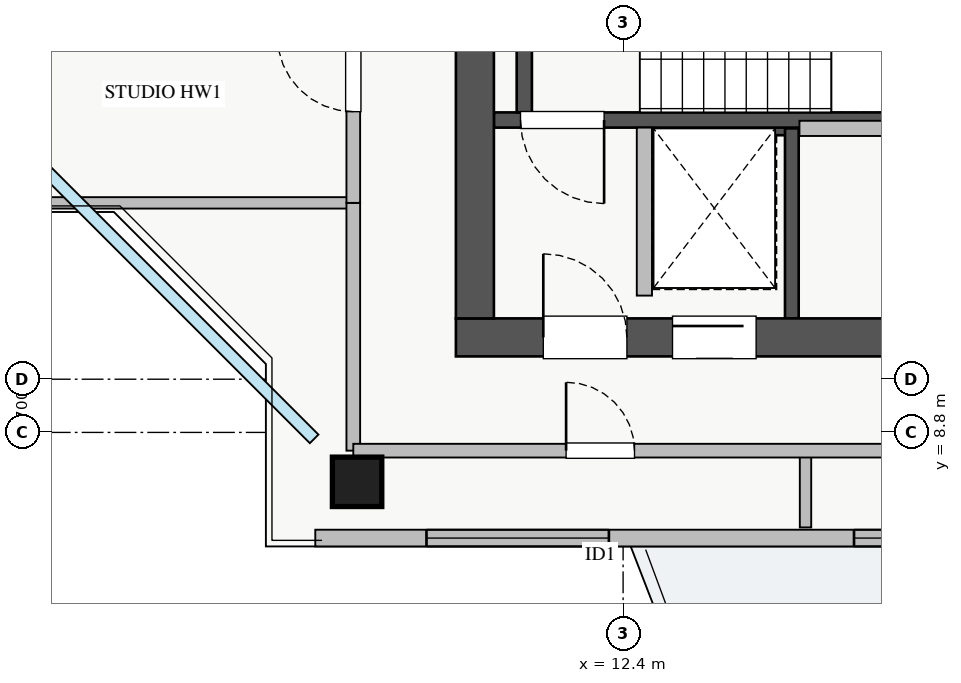
"""IFC4 building model, lengths in metres.
Left out: names, types, materials, properties, quantities, classifications, styles, units other than length and angle.
Written with IfcOpenShell. Run it as: python <this file> out.ifc"""

import sys

from ifc_helpers import new_model, si_unit, direction, frame, frame_2d, origin, origin_2d, place, context, subcontext, project, spatial, rectangle, extrude, source, transform, mapped, element, fill, save


model = new_model("IFC4")
c1 = context("Model", 3, precision=1e-05, world=origin(), true_north=direction((0.0, 1.0)))
c2 = subcontext(c1, "Body", "Model", "MODEL_VIEW")
j1 = project(units=[si_unit("LENGTHUNIT", "METRE"), si_unit("PLANEANGLEUNIT", "RADIAN")], contexts=[c1])
p1 = place(None, origin())
s1 = spatial("IfcSite", under=j1, at=p1, CompositionType="ELEMENT")
p2 = place(p1, origin())
s2 = spatial("IfcBuilding", under=s1, at=p2, CompositionType="ELEMENT")
p3 = place(p2, frame((0.0, 0.0, 260.0)))
s3 = spatial("IfcBuildingStorey", under=s2, at=p3, CompositionType="ELEMENT", Elevation=260.0)
p4 = place(p3, frame((12.68, 12.8, 0.0), z_axis=(0.0, 0.0, 1.0), x_axis=(1.0, 0.0, 0.0)))
e1 = element("IfcWall", 1, at=p4, inside=s3, PredefinedType="SHEAR", context=c2, shape_type="SweptSolid", body=[
    extrude(rectangle(XDim=1.94, YDim=0.18, at=frame_2d((0.97, 0.0))), origin(), (0.0, 0.0, 1.0), 3.03),
])
p5 = place(p3, frame((14.62, 10.3, 0.0), z_axis=(0.0, 0.0, 1.0), x_axis=(0.0, 1.0, 0.0)))
e2 = element("IfcWall", 2, at=p5, inside=s3, PredefinedType="SHEAR", context=c2, shape_type="SweptSolid", body=[
    extrude(rectangle(XDim=2.5, YDim=0.18, at=frame_2d((1.25, 0.0))), origin(), (0.0, 0.0, 1.0), 3.03),
])
p6 = place(p3, frame((10.7, 12.91, 0.0), z_axis=(0.0, 0.0, 1.0), x_axis=(1.0, 0.0, 0.0)))
e3 = element("IfcWall", 3, at=p6, inside=s3, PredefinedType="SHEAR", context=c2, shape_type="SweptSolid", body=[
    extrude(rectangle(XDim=7.45, YDim=0.2, at=frame_2d((3.725, 0.0))), origin(), (0.0, 0.0, 1.0), 3.25),
])
p7 = place(p6, frame((0.35, 0.0, 0.0)))
e4 = element("IfcOpeningElement", 4, at=p7, cuts=e3, PredefinedType="OPENING", context=c2, shape_type="SweptSolid", body=[
    extrude(rectangle(XDim=1.1, YDim=2.05, at=frame_2d((0.55, 1.025))), frame((0.0, 0.11, 0.0), z_axis=(0.0, -1.0, 0.0), x_axis=(1.0, 0.0, 0.0)), (0.0, 0.0, 1.0), 0.22),
])
p8 = place(p3, frame((11.1, 13.01, 0.0), z_axis=(0.0, 0.0, 1.0), x_axis=(0.0, 1.0, 0.0)))
e5 = element("IfcWall", 5, at=p8, inside=s3, PredefinedType="SHEAR", context=c2, shape_type="SweptSolid", body=[
    extrude(rectangle(XDim=2.94, YDim=0.2, at=frame_2d((1.47, 0.0))), origin(), (0.0, 0.0, 1.0), 3.25),
])
p9 = place(p3, frame((10.2, 10.05, 0.0), z_axis=(0.0, 0.0, 1.0), x_axis=(1.0, 0.0, 0.0)))
e6 = element("IfcWall", 6, at=p9, inside=s3, PredefinedType="SHEAR", context=c2, shape_type="SweptSolid", body=[
    extrude(rectangle(XDim=17.6, YDim=0.5, at=frame_2d((8.8, 0.0))), origin(), (0.0, 0.0, 1.0), 3.25),
])
p10 = place(p9, frame((1.15, 0.0, 0.0)))
e7 = element("IfcOpeningElement", 7, at=p10, cuts=e6, PredefinedType="OPENING", context=c2, shape_type="SweptSolid", body=[
    extrude(rectangle(XDim=1.1, YDim=2.05, at=frame_2d((0.55, 1.025))), frame((0.0, 0.26, 0.0), z_axis=(0.0, -1.0, 0.0), x_axis=(1.0, 0.0, 0.0)), (0.0, 0.0, 1.0), 0.52),
])
p11 = place(p9, frame((8.3, 0.0, 0.0)))
e8 = element("IfcOpeningElement", 8, at=p11, cuts=e6, PredefinedType="OPENING", context=c2, shape_type="SweptSolid", body=[
    extrude(rectangle(XDim=1.1, YDim=2.05, at=frame_2d((0.55, 1.025))), frame((0.0, 0.26, 0.0), z_axis=(0.0, -1.0, 0.0), x_axis=(1.0, 0.0, 0.0)), (0.0, 0.0, 1.0), 0.52),
])
p12 = place(p9, frame((2.85, 0.0, 0.0)))
e9 = element("IfcOpeningElement", 9, at=p12, cuts=e6, PredefinedType="OPENING", context=c2, shape_type="SweptSolid", body=[
    extrude(rectangle(XDim=1.1, YDim=2.05, at=frame_2d((0.55, 1.025))), frame((0.0, 0.26, 0.0), z_axis=(0.0, -1.0, 0.0), x_axis=(1.0, 0.0, 0.0)), (0.0, 0.0, 1.0), 0.52),
])
p13 = place(p9, frame((5.8, 0.0, 0.0)))
e10 = element("IfcOpeningElement", 10, at=p13, cuts=e6, PredefinedType="OPENING", context=c2, shape_type="SweptSolid", body=[
    extrude(rectangle(XDim=1.0, YDim=2.05, at=frame_2d((0.5, 1.025))), frame((0.0, 0.26, 0.0), z_axis=(0.0, -1.0, 0.0), x_axis=(1.0, 0.0, 0.0)), (0.0, 0.0, 1.0), 0.52),
])
p14 = place(p9, frame((14.74, 0.0, 0.0)))
e11 = element("IfcOpeningElement", 11, at=p14, cuts=e6, PredefinedType="OPENING", context=c2, shape_type="SweptSolid", body=[
    extrude(rectangle(XDim=1.0, YDim=2.05, at=frame_2d((0.5, 1.025))), frame((0.0, 0.26, 0.0), z_axis=(0.0, -1.0, 0.0), x_axis=(1.0, 0.0, 0.0)), (0.0, 0.0, 1.0), 0.52),
])
p15 = place(p9, frame((10.64, 0.0, 0.0)))
e12 = element("IfcOpeningElement", 12, at=p15, cuts=e6, PredefinedType="OPENING", context=c2, shape_type="SweptSolid", body=[
    extrude(rectangle(XDim=1.0, YDim=2.05, at=frame_2d((0.5, 1.025))), frame((0.0, 0.26, 0.0), z_axis=(0.0, -1.0, 0.0), x_axis=(1.0, 0.0, 0.0)), (0.0, 0.0, 1.0), 0.52),
])
p16 = place(p9, frame((13.09, 0.0, 0.0)))
e13 = element("IfcOpeningElement", 13, at=p16, cuts=e6, PredefinedType="OPENING", context=c2, shape_type="SweptSolid", body=[
    extrude(rectangle(XDim=1.0, YDim=2.05, at=frame_2d((0.5, 1.025))), frame((0.0, 0.26, 0.0), z_axis=(0.0, -1.0, 0.0), x_axis=(1.0, 0.0, 0.0)), (0.0, 0.0, 1.0), 0.52),
])
p17 = place(p3, frame((10.45, 10.3, 0.0), z_axis=(0.0, 0.0, 1.0), x_axis=(0.0, 1.0, 0.0)))
e14 = element("IfcWall", 14, at=p17, inside=s3, PredefinedType="SHEAR", context=c2, shape_type="SweptSolid", body=[
    extrude(rectangle(XDim=6.2, YDim=0.5, at=frame_2d((3.1, 0.0))), origin(), (0.0, 0.0, 1.0), 3.25),
])
m1 = source(origin(), c2, "Body", "SweptSolid", [
    extrude(rectangle(XDim=0.65, YDim=0.65, at=origin_2d()), origin(), (0.0, 0.0, 1.0), 3.25),
])
p18 = place(p3, frame((8.9, 8.15, 0.0), z_axis=(0.0, 0.0, 1.0), x_axis=(1.0, 0.0, 0.0)))
e15 = element("IfcColumn", 15, at=p18, inside=s3, PredefinedType="COLUMN", context=c2, shape_type="MappedRepresentation", body=[
    mapped(m1, transform((0.0, 0.0, 0.0), x_axis=(1.0, 0.0, 0.0), y_axis=(0.0, 1.0, 0.0), z_axis=(0.0, 0.0, 1.0), scale=1.0)),
])
p19 = place(p3, frame((8.35, 7.41, 0.0), z_axis=(0.0, 0.0, 1.0), x_axis=(1.0, 0.0, 0.0)))
e16 = element("IfcWall", 16, at=p19, inside=s3, PredefinedType="STANDARD", context=c2, shape_type="SweptSolid", body=[
    extrude(rectangle(XDim=21.3, YDim=0.22, at=frame_2d((10.65, 0.0))), origin(), (0.0, 0.0, 1.0), 2.57),
])
p20 = place(p19, frame((11.5, 0.0, 0.0)))
e17 = element("IfcOpeningElement", 17, at=p20, cuts=e16, PredefinedType="OPENING", context=c2, shape_type="SweptSolid", body=[
    extrude(rectangle(XDim=1.2, YDim=2.1, at=frame_2d((0.6, 1.05))), frame((0.0, 0.12, 0.0), z_axis=(0.0, -1.0, 0.0), x_axis=(1.0, 0.0, 0.0)), (0.0, 0.0, 1.0), 0.24),
])
p21 = place(p19, frame((1.463, 0.0, 0.9)))
e18 = element("IfcOpeningElement", 18, at=p21, cuts=e16, PredefinedType="OPENING", context=c2, shape_type="SweptSolid", body=[
    extrude(rectangle(XDim=2.4, YDim=1.48, at=frame_2d((1.2, 0.74))), frame((0.0, 0.12, 0.0), z_axis=(0.0, -1.0, 0.0), x_axis=(1.0, 0.0, 0.0)), (0.0, 0.0, 1.0), 0.24),
])
p22 = place(p19, frame((7.088, 0.0, 0.9)))
e19 = element("IfcOpeningElement", 19, at=p22, cuts=e16, PredefinedType="OPENING", context=c2, shape_type="SweptSolid", body=[
    extrude(rectangle(XDim=1.8, YDim=1.45, at=frame_2d((0.9, 0.725))), frame((0.0, 0.12, 0.0), z_axis=(0.0, -1.0, 0.0), x_axis=(1.0, 0.0, 0.0)), (0.0, 0.0, 1.0), 0.24),
])
p23 = place(p19, frame((19.775, 0.0, 0.9)))
e20 = element("IfcOpeningElement", 20, at=p23, cuts=e16, PredefinedType="OPENING", context=c2, shape_type="SweptSolid", body=[
    extrude(rectangle(XDim=1.2, YDim=1.4, at=frame_2d((0.6, 0.7))), frame((0.0, 0.12, 0.0), z_axis=(0.0, -1.0, 0.0), x_axis=(1.0, 0.0, 0.0)), (0.0, 0.0, 1.0), 0.24),
])
p24 = place(p19, frame((15.042, 0.0, 0.9)))
e21 = element("IfcOpeningElement", 21, at=p24, cuts=e16, PredefinedType="OPENING", context=c2, shape_type="SweptSolid", body=[
    extrude(rectangle(XDim=2.4, YDim=1.5, at=frame_2d((1.2, 0.75))), frame((0.0, 0.12, 0.0), z_axis=(0.0, -1.0, 0.0), x_axis=(1.0, 0.0, 0.0)), (0.0, 0.0, 1.0), 0.24),
])
p25 = place(p3, frame((12.68, 10.6, 0.0), z_axis=(0.0, 0.0, 1.0), x_axis=(0.0, 1.0, 0.0)))
e22 = element("IfcWall", 22, at=p25, inside=s3, PredefinedType="PARTITIONING", context=c2, shape_type="SweptSolid", body=[
    extrude(rectangle(XDim=2.21, YDim=0.2, at=frame_2d((1.105, 0.0))), origin(), (0.0, 0.0, 1.0), 3.03),
])
p26 = place(p3, frame((14.72, 12.8, 0.0), z_axis=(0.0, 0.0, 1.0), x_axis=(1.0, 0.0, 0.0)))
e23 = element("IfcWall", 23, at=p26, inside=s3, PredefinedType="PARTITIONING", context=c2, shape_type="SweptSolid", body=[
    extrude(rectangle(XDim=3.28, YDim=0.2, at=frame_2d((1.64, 0.0))), origin(), (0.0, 0.0, 1.0), 3.03),
])
p27 = place(p3, frame((3.55, 11.82, 0.0), z_axis=(0.0, 0.0, 1.0), x_axis=(1.0, 0.0, 0.0)))
e24 = element("IfcWall", 24, at=p27, inside=s3, PredefinedType="PARTITIONING", context=c2, shape_type="SweptSolid", body=[
    extrude(rectangle(XDim=5.3, YDim=0.15, at=frame_2d((2.65, 0.0))), origin(), (0.0, 0.0, 1.0), 3.03),
])
p28 = place(p3, frame((8.85, 8.56, 0.0), z_axis=(0.0, 0.0, 1.0), x_axis=(0.0, 1.0, 0.0)))
e25 = element("IfcWall", 25, at=p28, inside=s3, PredefinedType="PARTITIONING", context=c2, shape_type="SweptSolid", body=[
    extrude(rectangle(XDim=3.26, YDim=0.18, at=frame_2d((1.63, 0.0))), origin(), (0.0, 0.0, 1.0), 2.529),
])
p29 = place(p3, frame((14.8, 7.55, 0.0), z_axis=(0.0, 0.0, 1.0), x_axis=(0.0, 1.0, 0.0)))
e26 = element("IfcWall", 26, at=p29, inside=s3, PredefinedType="PARTITIONING", context=c2, shape_type="SweptSolid", body=[
    extrude(rectangle(XDim=1.01, YDim=0.15, at=frame_2d((0.505, 0.0))), origin(), (0.0, 0.0, 1.0), 3.03),
])
p30 = place(p3, frame((8.85, 8.56, 0.0), z_axis=(0.0, 0.0, 1.0), x_axis=(1.0, 0.0, 0.0)))
e27 = element("IfcWall", 27, at=p30, inside=s3, PredefinedType="PARTITIONING", context=c2, shape_type="SweptSolid", body=[
    extrude(rectangle(XDim=18.95, YDim=0.18, at=frame_2d((9.475, 0.0))), origin(), (0.0, 0.0, 1.0), 3.03),
])
p31 = place(p30, frame((2.8, 0.0, 0.0)))
e28 = element("IfcOpeningElement", 28, at=p31, cuts=e27, PredefinedType="OPENING", context=c2, shape_type="SweptSolid", body=[
    extrude(rectangle(XDim=0.9, YDim=2.05, at=frame_2d((0.45, 1.025))), frame((0.0, 0.1, 0.0), z_axis=(0.0, -1.0, 0.0), x_axis=(1.0, 0.0, 0.0)), (0.0, 0.0, 1.0), 0.2),
])
p32 = place(p30, frame((8.8, 0.0, 0.0)))
e29 = element("IfcOpeningElement", 29, at=p32, cuts=e27, PredefinedType="OPENING", context=c2, shape_type="SweptSolid", body=[
    extrude(rectangle(XDim=0.9, YDim=2.05, at=frame_2d((0.45, 1.025))), frame((0.0, 0.1, 0.0), z_axis=(0.0, -1.0, 0.0), x_axis=(1.0, 0.0, 0.0)), (0.0, 0.0, 1.0), 0.2),
])
p33 = place(p30, frame((15.2, 0.0, 0.0)))
e30 = element("IfcOpeningElement", 30, at=p33, cuts=e27, PredefinedType="OPENING", context=c2, shape_type="SweptSolid", body=[
    extrude(rectangle(XDim=0.9, YDim=2.05, at=frame_2d((0.45, 1.025))), frame((0.0, 0.1, 0.0), z_axis=(0.0, -1.0, 0.0), x_axis=(1.0, 0.0, 0.0)), (0.0, 0.0, 1.0), 0.2),
])
p34 = place(p3, frame((8.85, 11.82, 0.0), z_axis=(0.0, 0.0, 1.0), x_axis=(0.0, 1.0, 0.0)))
e31 = element("IfcWall", 31, at=p34, inside=s3, PredefinedType="PARTITIONING", context=c2, shape_type="SweptSolid", body=[
    extrude(rectangle(XDim=22.36, YDim=0.18, at=frame_2d((11.18, 0.0))), origin(), (0.0, 0.0, 1.0), 2.529),
])
p35 = place(p34, frame((1.2, 0.0, 0.0)))
e32 = element("IfcOpeningElement", 32, at=p35, cuts=e31, PredefinedType="OPENING", context=c2, shape_type="SweptSolid", body=[
    extrude(rectangle(XDim=1.0, YDim=2.05, at=frame_2d((0.5, 1.025))), frame((0.0, 0.1, 0.0), z_axis=(0.0, -1.0, 0.0), x_axis=(1.0, 0.0, 0.0)), (0.0, 0.0, 1.0), 0.2),
])
p36 = place(p34, frame((8.445, 0.0, 0.0)))
e33 = element("IfcOpeningElement", 33, at=p36, cuts=e31, PredefinedType="OPENING", context=c2, shape_type="SweptSolid", body=[
    extrude(rectangle(XDim=1.0, YDim=2.05, at=frame_2d((0.5, 1.025))), frame((0.0, 0.1, 0.0), z_axis=(0.0, -1.0, 0.0), x_axis=(1.0, 0.0, 0.0)), (0.0, 0.0, 1.0), 0.2),
])
p37 = place(p34, frame((16.23, 0.0, 0.0)))
e34 = element("IfcOpeningElement", 34, at=p37, cuts=e31, PredefinedType="OPENING", context=c2, shape_type="SweptSolid", body=[
    extrude(rectangle(XDim=1.0, YDim=2.05, at=frame_2d((0.5, 1.025))), frame((0.0, 0.1, 0.0), z_axis=(0.0, -1.0, 0.0), x_axis=(1.0, 0.0, 0.0)), (0.0, 0.0, 1.0), 0.2),
])
m2 = source(origin(), c2, "Body", "SweptSolid", [
    extrude(rectangle(XDim=2.4, YDim=1.48, at=frame_2d((1.2, 0.74))), frame((0.0, 0.03, 0.0), z_axis=(0.0, -1.0, 0.0), x_axis=(1.0, 0.0, 0.0)), (0.0, 0.0, 1.0), 0.06),
])
p38 = place(p21, origin())
e35 = element("IfcWindow", 35, at=p38, inside=s3, PartitioningType="TRIPLE_PANEL_VERTICAL", PredefinedType="WINDOW", context=c2, shape_type="MappedRepresentation", body=[
    mapped(m2, transform((0.0, 0.0, 0.0), x_axis=(1.0, 0.0, 0.0), y_axis=(0.0, 1.0, 0.0), z_axis=(0.0, 0.0, 1.0), scale=1.0)),
])
fill(e18, e35)
m3 = source(origin(), c2, "Body", "SweptSolid", [
    extrude(rectangle(XDim=1.8, YDim=1.45, at=frame_2d((0.9, 0.725))), frame((0.0, 0.03, 0.0), z_axis=(0.0, -1.0, 0.0), x_axis=(1.0, 0.0, 0.0)), (0.0, 0.0, 1.0), 0.06),
])
p39 = place(p22, origin())
e36 = element("IfcWindow", 36, at=p39, inside=s3, PartitioningType="DOUBLE_PANEL_VERTICAL", PredefinedType="WINDOW", context=c2, shape_type="MappedRepresentation", body=[
    mapped(m3, transform((0.0, 0.0, 0.0), x_axis=(1.0, 0.0, 0.0), y_axis=(0.0, 1.0, 0.0), z_axis=(0.0, 0.0, 1.0), scale=1.0)),
])
fill(e19, e36)
m4 = source(origin(), c2, "Body", "SweptSolid", [
    extrude(rectangle(XDim=1.1, YDim=2.05, at=frame_2d((0.55, 1.025))), frame((0.0, 0.025, 0.0), z_axis=(0.0, -1.0, 0.0), x_axis=(1.0, 0.0, 0.0)), (0.0, 0.0, 1.0), 0.05),
])
p40 = place(p10, origin())
e37 = element("IfcDoor", 37, at=p40, inside=s3, OperationType="SINGLE_SWING_LEFT", PredefinedType="DOOR", context=c2, shape_type="MappedRepresentation", body=[
    mapped(m4, transform((0.0, 0.0, 0.0), x_axis=(1.0, 0.0, 0.0), y_axis=(0.0, 1.0, 0.0), z_axis=(0.0, 0.0, 1.0), scale=1.0)),
])
fill(e7, e37)
p41 = place(p7, frame((1.1, 0.0, 0.0), z_axis=(0.0, 0.0, 1.0), x_axis=(-1.0, 0.0, 0.0)))
e38 = element("IfcDoor", 38, at=p41, inside=s3, OperationType="SINGLE_SWING_RIGHT", PredefinedType="DOOR", context=c2, shape_type="MappedRepresentation", body=[
    mapped(m4, transform((0.0, 0.0, 0.0), x_axis=(1.0, 0.0, 0.0), y_axis=(0.0, 1.0, 0.0), z_axis=(0.0, 0.0, 1.0), scale=1.0)),
])
fill(e4, e38)
p42 = place(p12, origin())
e39 = element("IfcDoor", 39, at=p42, inside=s3, OperationType="SLIDING_TO_RIGHT", PredefinedType="DOOR", context=c2, shape_type="MappedRepresentation", body=[
    mapped(m4, transform((0.0, 0.0, 0.0), x_axis=(1.0, 0.0, 0.0), y_axis=(0.0, 1.0, 0.0), z_axis=(0.0, 0.0, 1.0), scale=1.0)),
])
fill(e9, e39)
m5 = source(origin(), c2, "Body", "SweptSolid", [
    extrude(rectangle(XDim=0.9, YDim=2.05, at=frame_2d((0.45, 1.025))), frame((0.0, 0.025, 0.0), z_axis=(0.0, -1.0, 0.0), x_axis=(1.0, 0.0, 0.0)), (0.0, 0.0, 1.0), 0.05),
])
p43 = place(p31, origin())
e40 = element("IfcDoor", 40, at=p43, inside=s3, OperationType="SINGLE_SWING_LEFT", PredefinedType="DOOR", context=c2, shape_type="MappedRepresentation", body=[
    mapped(m5, transform((0.0, 0.0, 0.0), x_axis=(1.0, 0.0, 0.0), y_axis=(0.0, 1.0, 0.0), z_axis=(0.0, 0.0, 1.0), scale=1.0)),
])
fill(e28, e40)
m6 = source(origin(), c2, "Body", "SweptSolid", [
    extrude(rectangle(XDim=1.0, YDim=2.05, at=frame_2d((0.5, 1.025))), frame((0.0, 0.025, 0.0), z_axis=(0.0, -1.0, 0.0), x_axis=(1.0, 0.0, 0.0)), (0.0, 0.0, 1.0), 0.05),
])
p44 = place(p35, origin())
e41 = element("IfcDoor", 41, at=p44, inside=s3, OperationType="SINGLE_SWING_RIGHT", PredefinedType="DOOR", context=c2, shape_type="MappedRepresentation", body=[
    mapped(m6, transform((0.0, 0.0, 0.0), x_axis=(1.0, 0.0, 0.0), y_axis=(0.0, 1.0, 0.0), z_axis=(0.0, 0.0, 1.0), scale=1.0)),
])
fill(e32, e41)
save(model, sys.argv[1])
